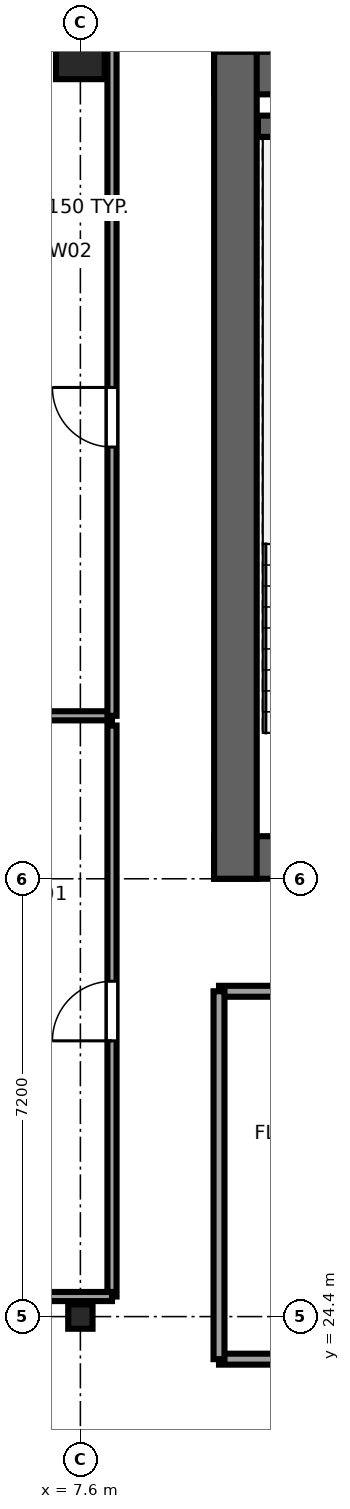
"""IFC4 building model, lengths in metres.
Left out: names, types, materials, properties, quantities, classifications, styles, units other than length and angle.
Written with IfcOpenShell. Run it as: python <this file> out.ifc"""

import sys

from ifc_helpers import new_model, si_unit, direction, frame, frame_2d, origin, origin_2d, place, context, subcontext, project, spatial, rectangle, i_section, extrude, source, transform, mapped, element, fill, save


model = new_model("IFC4")
c1 = context("Model", 3, precision=1e-05, world=origin(), true_north=direction((0.0, 1.0)))
c2 = subcontext(c1, "Body", "Model", "MODEL_VIEW")
j1 = project(units=[si_unit("LENGTHUNIT", "METRE"), si_unit("PLANEANGLEUNIT", "RADIAN")], contexts=[c1])
p1 = place(None, origin())
s1 = spatial("IfcSite", under=j1, at=p1, CompositionType="ELEMENT")
p2 = place(p1, origin())
s2 = spatial("IfcBuilding", under=s1, at=p2, CompositionType="ELEMENT")
p3 = place(p2, frame((0.0, 0.0, 164.8)))
s3 = spatial("IfcBuildingStorey", under=s2, at=p3, CompositionType="ELEMENT", Elevation=164.8)
p4 = place(p3, frame((9.8, 31.95, 0.0), z_axis=(0.0, 0.0, 1.0), x_axis=(1.0, 0.0, 0.0)))
e1 = element("IfcWall", 1, at=p4, inside=s3, PredefinedType="SHEAR", context=c2, shape_type="SweptSolid", body=[
    extrude(rectangle(XDim=26.4, YDim=0.7, at=frame_2d((13.2, 0.0))), origin(), (0.0, 0.0, 1.0), 3.55),
])
p5 = place(p4, frame((6.32, 0.0, 0.0), z_axis=(0.0, 0.0, 1.0), x_axis=(-1.0, 0.0, 0.0)))
e2 = element("IfcOpeningElement", 2, at=p5, cuts=e1, PredefinedType="OPENING", context=c2, shape_type="SweptSolid", body=[
    extrude(rectangle(XDim=1.5, YDim=2.04, at=frame_2d((0.75, 1.02))), frame((0.0, 0.36, 0.0), z_axis=(0.0, -1.0, 0.0), x_axis=(1.0, 0.0, 0.0)), (0.0, 0.0, 1.0), 0.72),
])
p6 = place(p4, frame((13.95, 0.0, 0.0), z_axis=(0.0, 0.0, 1.0), x_axis=(-1.0, 0.0, 0.0)))
e3 = element("IfcOpeningElement", 3, at=p6, cuts=e1, PredefinedType="OPENING", context=c2, shape_type="SweptSolid", body=[
    extrude(rectangle(XDim=1.5, YDim=2.04, at=frame_2d((0.75, 1.02))), frame((0.0, 0.36, 0.0), z_axis=(0.0, -1.0, 0.0), x_axis=(1.0, 0.0, 0.0)), (0.0, 0.0, 1.0), 0.72),
])
p7 = place(p4, frame((20.25, 0.0, 0.0), z_axis=(0.0, 0.0, 1.0), x_axis=(-1.0, 0.0, 0.0)))
e4 = element("IfcOpeningElement", 4, at=p7, cuts=e1, PredefinedType="OPENING", context=c2, shape_type="SweptSolid", body=[
    extrude(rectangle(XDim=1.5, YDim=2.04, at=frame_2d((0.75, 1.02))), frame((0.0, 0.36, 0.0), z_axis=(0.0, -1.0, 0.0), x_axis=(1.0, 0.0, 0.0)), (0.0, 0.0, 1.0), 0.72),
])
p8 = place(p4, frame((8.37, 0.0, 0.0), z_axis=(0.0, 0.0, 1.0), x_axis=(-1.0, 0.0, 0.0)))
e5 = element("IfcOpeningElement", 5, at=p8, cuts=e1, PredefinedType="OPENING", context=c2, shape_type="SweptSolid", body=[
    extrude(rectangle(XDim=0.82, YDim=2.01, at=frame_2d((0.41, 1.005))), frame((0.0, 0.36, 0.0), z_axis=(0.0, -1.0, 0.0), x_axis=(1.0, 0.0, 0.0)), (0.0, 0.0, 1.0), 0.72),
])
p9 = place(p3, frame((9.8, 44.85, 0.0), z_axis=(0.0, 0.0, 1.0), x_axis=(1.0, 0.0, 0.0)))
e6 = element("IfcWall", 6, at=p9, inside=s3, PredefinedType="SHEAR", context=c2, shape_type="SweptSolid", body=[
    extrude(rectangle(XDim=26.4, YDim=0.7, at=frame_2d((13.2, 0.0))), origin(), (0.0, 0.0, 1.0), 3.55),
])
p10 = place(p3, frame((10.15, 31.6, 0.0), z_axis=(0.0, 0.0, 1.0), x_axis=(0.0, 1.0, 0.0)))
e7 = element("IfcWall", 7, at=p10, inside=s3, PredefinedType="SHEAR", context=c2, shape_type="SweptSolid", body=[
    extrude(rectangle(XDim=13.6, YDim=0.7, at=frame_2d((6.8, 0.0))), origin(), (0.0, 0.0, 1.0), 3.55),
])
p11 = place(p3, frame((10.52, 43.975, 0.0), z_axis=(0.0, 0.0, 1.0), x_axis=(1.0, 0.0, 0.0)))
e8 = element("IfcWall", 8, at=p11, inside=s3, PredefinedType="SHEAR", context=c2, shape_type="SweptSolid", body=[
    extrude(rectangle(XDim=3.6, YDim=0.35, at=frame_2d((1.8, 0.0))), origin(), (0.0, 0.0, 1.0), 3.55),
])
m1 = source(origin(), c2, "Body", "SweptSolid", [
    extrude(i_section(OverallWidth=0.4, OverallDepth=0.4, WebThickness=0.02, FlangeThickness=0.035, at=origin_2d()), origin(), (0.0, 0.0, 1.0), 3.55),
])
p12 = place(p3, frame((7.6, 24.4, 0.0), z_axis=(0.0, 0.0, 1.0), x_axis=(1.0, 0.0, 0.0)))
e9 = element("IfcColumn", 9, at=p12, inside=s3, PredefinedType="COLUMN", context=c2, shape_type="MappedRepresentation", body=[
    mapped(m1, transform((0.0, 0.0, 0.0), x_axis=(1.0, 0.0, 0.0), y_axis=(0.0, 1.0, 0.0), z_axis=(0.0, 0.0, 1.0), scale=1.0)),
])
m2 = source(origin(), c2, "Body", "SweptSolid", [
    extrude(rectangle(XDim=0.8, YDim=0.8, at=origin_2d()), origin(), (0.0, 0.0, 1.0), 3.55),
])
p13 = place(p3, frame((7.6, 45.15, 0.0), z_axis=(0.0, 0.0, 1.0), x_axis=(1.0, 0.0, 0.0)))
e10 = element("IfcColumn", 10, at=p13, inside=s3, PredefinedType="COLUMN", context=c2, shape_type="MappedRepresentation", body=[
    mapped(m2, transform((0.0, 0.0, 0.0), x_axis=(1.0, 0.0, 0.0), y_axis=(0.0, 1.0, 0.0), z_axis=(0.0, 0.0, 1.0), scale=1.0)),
])
p14 = place(p3, frame((3.005, 34.28, 0.0), z_axis=(0.0, 0.0, 1.0), x_axis=(1.0, 0.0, 0.0)))
e11 = element("IfcWall", 11, at=p14, inside=s3, PredefinedType="PARTITIONING", context=c2, shape_type="SweptSolid", body=[
    extrude(rectangle(XDim=5.115, YDim=0.15, at=frame_2d((2.558, 0.0))), origin(), (0.0, 0.0, 1.0), 2.16),
])
p15 = place(p3, frame((8.12, 24.73, 0.0), z_axis=(0.0, 0.0, 1.0), x_axis=(0.0, 1.0, 0.0)))
e12 = element("IfcWall", 12, at=p15, inside=s3, PredefinedType="PARTITIONING", context=c2, shape_type="SweptSolid", body=[
    extrude(rectangle(XDim=9.39, YDim=0.15, at=frame_2d((4.695, 0.0))), origin(), (0.0, 0.0, 1.0), 3.37),
])
p16 = place(p15, frame((4.205, 0.0, 0.0)))
e13 = element("IfcOpeningElement", 13, at=p16, cuts=e12, PredefinedType="OPENING", context=c2, shape_type="SweptSolid", body=[
    extrude(rectangle(XDim=0.98, YDim=2.12, at=frame_2d((0.49, 1.06))), frame((0.0, 0.085, 0.0), z_axis=(0.0, -1.0, 0.0), x_axis=(1.0, 0.0, 0.0)), (0.0, 0.0, 1.0), 0.17),
])
p17 = place(p3, frame((5.07, 24.73, 0.0), z_axis=(0.0, 0.0, 1.0), x_axis=(1.0, 0.0, 0.0)))
e14 = element("IfcWall", 14, at=p17, inside=s3, PredefinedType="PARTITIONING", context=c2, shape_type="SweptSolid", body=[
    extrude(rectangle(XDim=3.05, YDim=0.15, at=frame_2d((1.525, 0.0))), origin(), (0.0, 0.0, 1.0), 3.37),
])
p18 = place(p3, frame((8.12, 34.28, 0.0), z_axis=(0.0, 0.0, 1.0), x_axis=(0.0, 1.0, 0.0)))
e15 = element("IfcWall", 15, at=p18, inside=s3, PredefinedType="PARTITIONING", context=c2, shape_type="SweptSolid", body=[
    extrude(rectangle(XDim=11.315, YDim=0.15, at=frame_2d((5.657, 0.0))), origin(), (0.0, 0.0, 1.0), 3.37),
])
p19 = place(p18, frame((4.42, 0.0, 0.0)))
e16 = element("IfcOpeningElement", 16, at=p19, cuts=e15, PredefinedType="OPENING", context=c2, shape_type="SweptSolid", body=[
    extrude(rectangle(XDim=0.98, YDim=2.12, at=frame_2d((0.49, 1.06))), frame((0.0, 0.085, 0.0), z_axis=(0.0, -1.0, 0.0), x_axis=(1.0, 0.0, 0.0)), (0.0, 0.0, 1.0), 0.17),
])
p20 = place(p3, frame((9.88, 23.7, 0.0), z_axis=(0.0, 0.0, 1.0), x_axis=(1.0, 0.0, 0.0)))
e17 = element("IfcWall", 17, at=p20, inside=s3, PredefinedType="PARTITIONING", context=c2, shape_type="SweptSolid", body=[
    extrude(rectangle(XDim=4.22, YDim=0.18, at=frame_2d((2.11, 0.0))), origin(), (0.0, 0.0, 1.0), 3.37),
])
p21 = place(p20, frame((1.285, 0.0, 0.0)))
e18 = element("IfcOpeningElement", 18, at=p21, cuts=e17, PredefinedType="OPENING", context=c2, shape_type="SweptSolid", body=[
    extrude(rectangle(XDim=1.65, YDim=2.15, at=frame_2d((0.825, 1.075))), frame((0.0, 0.1, 0.0), z_axis=(0.0, -1.0, 0.0), x_axis=(1.0, 0.0, 0.0)), (0.0, 0.0, 1.0), 0.2),
])
p22 = place(p3, frame((9.88, 29.75, 0.0), z_axis=(0.0, 0.0, 1.0), x_axis=(1.0, 0.0, 0.0)))
e19 = element("IfcWall", 19, at=p22, inside=s3, PredefinedType="PARTITIONING", context=c2, shape_type="SweptSolid", body=[
    extrude(rectangle(XDim=4.22, YDim=0.18, at=frame_2d((2.11, 0.0))), origin(), (0.0, 0.0, 1.0), 3.37),
])
p23 = place(p3, frame((9.88, 23.7, 0.0), z_axis=(0.0, 0.0, 1.0), x_axis=(0.0, 1.0, 0.0)))
e20 = element("IfcWall", 20, at=p23, inside=s3, PredefinedType="PARTITIONING", context=c2, shape_type="SweptSolid", body=[
    extrude(rectangle(XDim=6.05, YDim=0.18, at=frame_2d((3.025, 0.0))), origin(), (0.0, 0.0, 1.0), 3.37),
])
m3 = source(origin(), c2, "Body", "SweptSolid", [
    extrude(rectangle(XDim=0.98, YDim=2.12, at=frame_2d((0.49, 1.06))), frame((0.0, 0.025, 0.0), z_axis=(0.0, -1.0, 0.0), x_axis=(1.0, 0.0, 0.0)), (0.0, 0.0, 1.0), 0.05),
])
p24 = place(p16, origin())
e21 = element("IfcDoor", 21, at=p24, inside=s3, OperationType="SINGLE_SWING_LEFT", PredefinedType="DOOR", context=c2, shape_type="MappedRepresentation", body=[
    mapped(m3, transform((0.0, 0.0, 0.0), x_axis=(1.0, 0.0, 0.0), y_axis=(0.0, 1.0, 0.0), z_axis=(0.0, 0.0, 1.0), scale=1.0)),
])
fill(e13, e21)
p25 = place(p19, origin())
e22 = element("IfcDoor", 22, at=p25, inside=s3, OperationType="SINGLE_SWING_RIGHT", PredefinedType="DOOR", context=c2, shape_type="MappedRepresentation", body=[
    mapped(m3, transform((0.0, 0.0, 0.0), x_axis=(1.0, 0.0, 0.0), y_axis=(0.0, 1.0, 0.0), z_axis=(0.0, 0.0, 1.0), scale=1.0)),
])
fill(e16, e22)
save(model, sys.argv[1])
